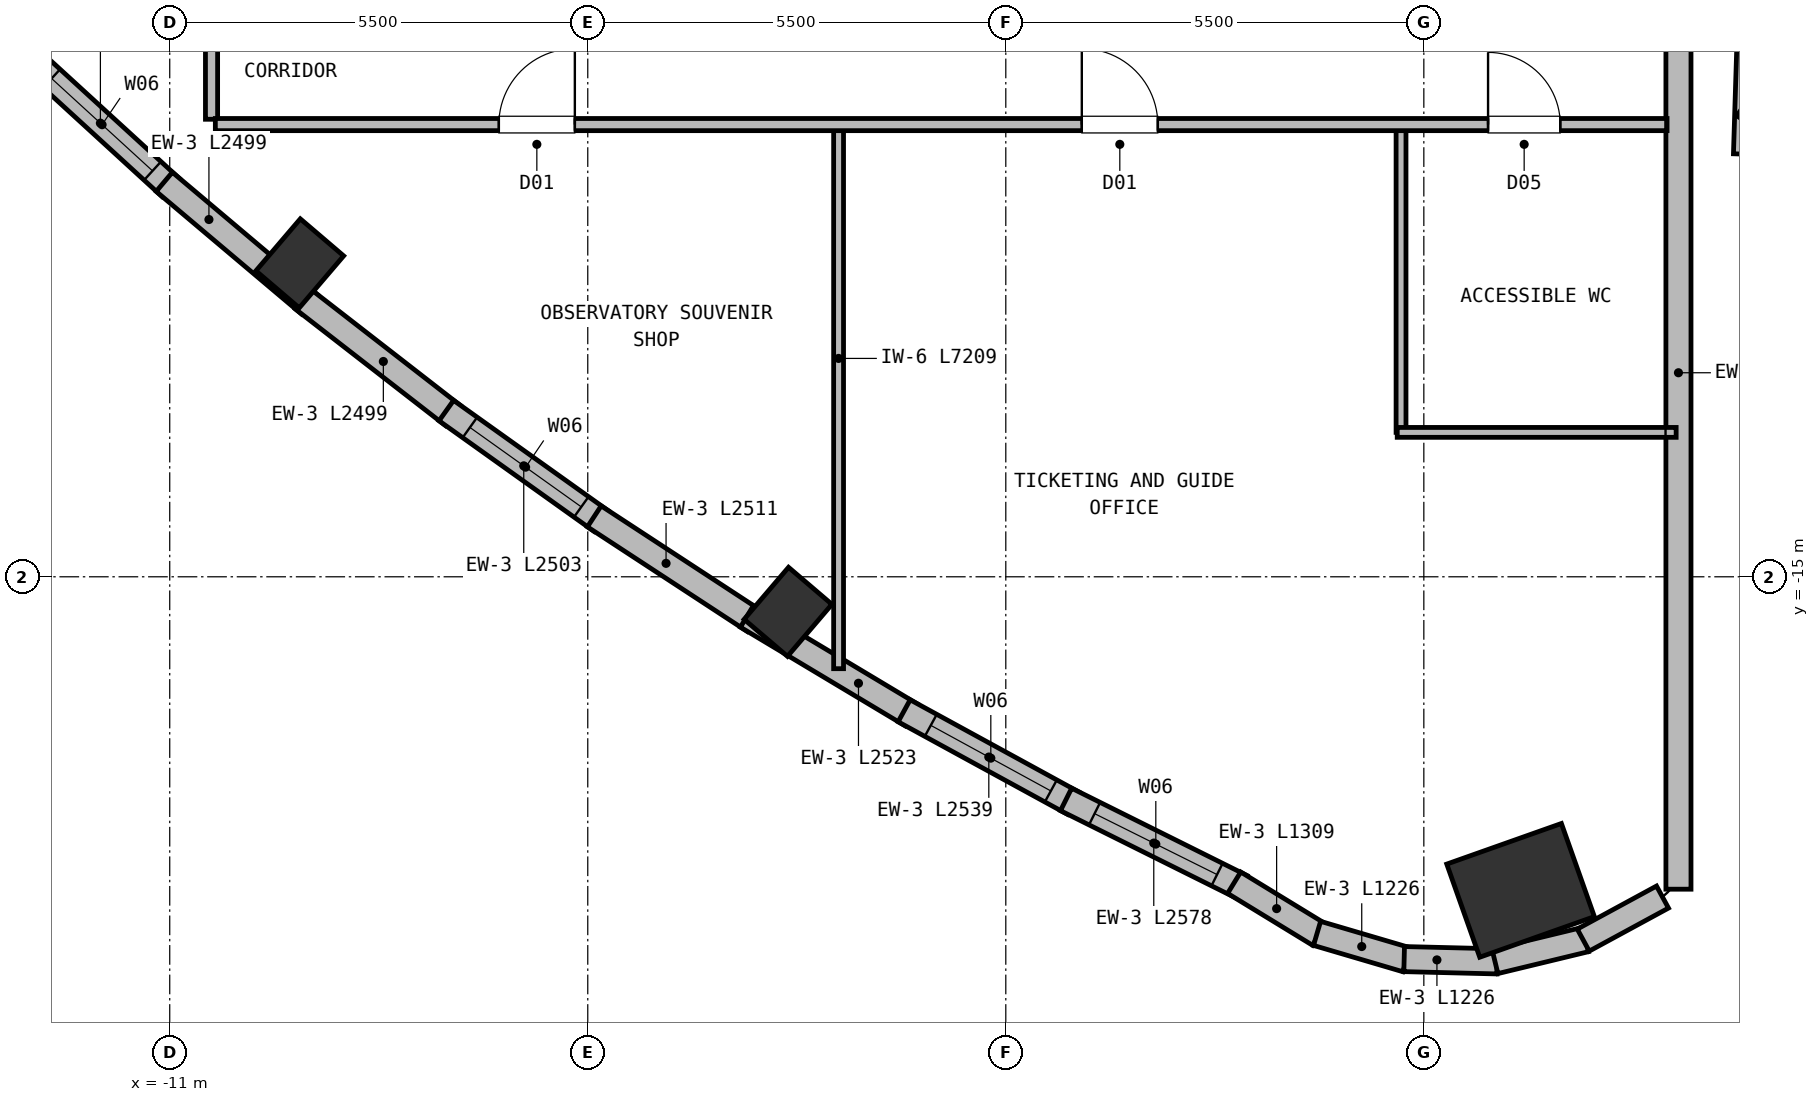
"""IFC4 building model, lengths in metres.
Left out: names, types, materials, properties, quantities, classifications, styles, units other than length and angle.
Written with IfcOpenShell. Run it as: python <this file> out.ifc"""

import sys

from ifc_helpers import new_model, si_unit, direction, frame, frame_2d, origin, origin_2d, place, context, subcontext, project, spatial, rectangle, extrude, element, fill, save


model = new_model("IFC4")
c1 = context("Model", 3, precision=1e-05, world=origin(), true_north=direction((0.0, 1.0)))
c2 = subcontext(c1, "Body", "Model", "MODEL_VIEW")
j1 = project(units=[si_unit("LENGTHUNIT", "METRE"), si_unit("PLANEANGLEUNIT", "RADIAN")], contexts=[c1])
p1 = place(None, origin())
s1 = spatial("IfcSite", under=j1, at=p1, CompositionType="ELEMENT")
p2 = place(p1, origin())
s2 = spatial("IfcBuilding", under=s1, at=p2, CompositionType="ELEMENT")
p3 = place(p2, frame((0.0, 0.0, 286.0)))
s3 = spatial("IfcBuildingStorey", under=s2, at=p3, CompositionType="ELEMENT", Elevation=286.0)
for number, where, z_axis, x_axis in (
    (1, (-9.289, -10.876, 0.0), (0.0, 0.0, 1.0), (-0.76, 0.649, 0.0)),
    (2, (-2.865, -15.461, 0.0), (0.0, 0.0, 1.0), (-0.76, 0.649, 0.0)),
):
    element("IfcColumn", number, at=place(p3, frame(where, z_axis=z_axis, x_axis=x_axis)), inside=s3, PredefinedType="COLUMN", context=c2, shape_type="SweptSolid", body=[
        extrude(rectangle(XDim=0.75, YDim=0.9, at=origin_2d()), origin(), (0.0, 0.0, 1.0), 4.4),
    ])
p4 = place(p3, frame((6.773, -19.126, 0.0), z_axis=(0.0, 0.0, 1.0), x_axis=(-0.333806859234, 0.942641491092, 0.0)))
e3 = element("IfcColumn", 3, at=p4, inside=s3, PredefinedType="COLUMN", context=c2, shape_type="SweptSolid", body=[
    extrude(rectangle(XDim=1.3, YDim=1.6, at=origin_2d()), origin(), (0.0, 0.0, 1.0), 4.4),
])
p5 = place(p3, frame((8.85, -5.52, 0.0), z_axis=(0.0, 0.0, 1.0), x_axis=(0.0, -1.0, 0.0)))
e4 = element("IfcWall", 4, at=p5, inside=s3, PredefinedType="SOLIDWALL", context=c2, shape_type="SweptSolid", body=[
    extrude(rectangle(XDim=13.591, YDim=0.33, at=frame_2d((6.795, 0.0))), origin(), (0.0, 0.0, 1.0), 4.13),
])
p6 = place(p3, frame((9.739, -9.439, 0.0), z_axis=(0.0, 0.0, 1.0), x_axis=(0.031147484759, 0.999514799387, 0.0)))
e5 = element("IfcWall", 5, at=p6, inside=s3, PredefinedType="SOLIDWALL", context=c2, shape_type="SweptSolid", body=[
    extrude(rectangle(XDim=6.114, YDim=0.33, at=frame_2d((3.057, 0.0))), origin(), (0.0, 0.0, 1.0), 3.65),
])
p7 = place(p3, frame((-10.989, -9.876, 0.0), z_axis=(0.0, 0.0, 1.0), x_axis=(-0.737627628948, 0.675207731748, 0.0)))
e6 = element("IfcWall", 6, at=p7, inside=s3, PredefinedType="SOLIDWALL", context=c2, shape_type="SweptSolid", body=[
    extrude(rectangle(XDim=2.503, YDim=0.33, at=frame_2d((1.251, 0.0))), origin(), (0.0, 0.0, 1.0), 4.13),
])
p8 = place(p7, frame((0.322, 0.0, 0.72)))
e7 = element("IfcOpeningElement", 7, at=p8, cuts=e6, PredefinedType="OPENING", context=c2, shape_type="SweptSolid", body=[
    extrude(rectangle(XDim=1.8, YDim=2.25, at=frame_2d((0.9, 1.125))), frame((0.0, 0.175, 0.0), z_axis=(0.0, -1.0, 0.0), x_axis=(1.0, 0.0, 0.0)), (0.0, 0.0, 1.0), 0.35),
])
p9 = place(p3, frame((-9.161, -11.415, 0.0), z_axis=(0.0, 0.0, 1.0), x_axis=(-0.764315556833, 0.644842406781, 0.0)))
e8 = element("IfcWall", 8, at=p9, inside=s3, PredefinedType="SOLIDWALL", context=c2, shape_type="SweptSolid", body=[
    extrude(rectangle(XDim=2.499, YDim=0.33, at=frame_2d((1.25, 0.0))), origin(), (0.0, 0.0, 1.0), 4.13),
])
p10 = place(p3, frame((-7.273, -12.879, 0.0), z_axis=(0.0, 0.0, 1.0), x_axis=(-0.789841179094, 0.613311431336, 0.0)))
e9 = element("IfcWall", 9, at=p10, inside=s3, PredefinedType="SOLIDWALL", context=c2, shape_type="SweptSolid", body=[
    extrude(rectangle(XDim=2.499, YDim=0.33, at=frame_2d((1.25, 0.0))), origin(), (0.0, 0.0, 1.0), 4.13),
])
p11 = place(p3, frame((-5.323, -14.267, 0.0), z_axis=(0.0, 0.0, 1.0), x_axis=(-0.814029925436, 0.580822933857, 0.0)))
e10 = element("IfcWall", 10, at=p11, inside=s3, PredefinedType="SOLIDWALL", context=c2, shape_type="SweptSolid", body=[
    extrude(rectangle(XDim=2.503, YDim=0.33, at=frame_2d((1.251, 0.0))), origin(), (0.0, 0.0, 1.0), 4.13),
])
p12 = place(p11, frame((0.322, 0.0, 0.72)))
e11 = element("IfcOpeningElement", 11, at=p12, cuts=e10, PredefinedType="OPENING", context=c2, shape_type="SweptSolid", body=[
    extrude(rectangle(XDim=1.8, YDim=2.25, at=frame_2d((0.9, 1.125))), frame((0.0, 0.175, 0.0), z_axis=(0.0, -1.0, 0.0), x_axis=(1.0, 0.0, 0.0)), (0.0, 0.0, 1.0), 0.35),
])
p13 = place(p3, frame((-3.313, -15.58, 0.0), z_axis=(0.0, 0.0, 1.0), x_axis=(-0.836746876737, 0.547589868671, 0.0)))
e12 = element("IfcWall", 12, at=p13, inside=s3, PredefinedType="SOLIDWALL", context=c2, shape_type="SweptSolid", body=[
    extrude(rectangle(XDim=2.511, YDim=0.33, at=frame_2d((1.255, 0.0))), origin(), (0.0, 0.0, 1.0), 4.13),
])
p14 = place(p3, frame((-1.242, -16.818, 0.0), z_axis=(0.0, 0.0, 1.0), x_axis=(-0.857902474262, 0.513812557899, 0.0)))
e13 = element("IfcWall", 13, at=p14, inside=s3, PredefinedType="SOLIDWALL", context=c2, shape_type="SweptSolid", body=[
    extrude(rectangle(XDim=2.523, YDim=0.33, at=frame_2d((1.262, 0.0))), origin(), (0.0, 0.0, 1.0), 4.13),
])
p15 = place(p3, frame((0.89, -17.98, 0.0), z_axis=(0.0, 0.0, 1.0), x_axis=(-0.877542510611, 0.479498844702, 0.0)))
e14 = element("IfcWall", 14, at=p15, inside=s3, PredefinedType="SOLIDWALL", context=c2, shape_type="SweptSolid", body=[
    extrude(rectangle(XDim=2.539, YDim=0.33, at=frame_2d((1.269, 0.0))), origin(), (0.0, 0.0, 1.0), 4.13),
])
p16 = place(p15, frame((0.339, 0.0, 0.72)))
e15 = element("IfcOpeningElement", 15, at=p16, cuts=e14, PredefinedType="OPENING", context=c2, shape_type="SweptSolid", body=[
    extrude(rectangle(XDim=1.8, YDim=2.25, at=frame_2d((0.9, 1.125))), frame((0.0, 0.175, 0.0), z_axis=(0.0, -1.0, 0.0), x_axis=(1.0, 0.0, 0.0)), (0.0, 0.0, 1.0), 0.35),
])
p17 = place(p3, frame((3.101, -19.078, 0.0), z_axis=(0.0, 0.0, 1.0), x_axis=(-0.895277941462, 0.445508033073, 0.0)))
e16 = element("IfcWall", 16, at=p17, inside=s3, PredefinedType="SOLIDWALL", context=c2, shape_type="SweptSolid", body=[
    extrude(rectangle(XDim=2.578, YDim=0.33, at=frame_2d((1.289, 0.0))), origin(), (0.0, 0.0, 1.0), 4.13),
])
p18 = place(p17, frame((0.359, 0.0, 0.72)))
e17 = element("IfcOpeningElement", 17, at=p18, cuts=e16, PredefinedType="OPENING", context=c2, shape_type="SweptSolid", body=[
    extrude(rectangle(XDim=1.8, YDim=2.25, at=frame_2d((0.9, 1.125))), frame((0.0, 0.175, 0.0), z_axis=(0.0, -1.0, 0.0), x_axis=(1.0, 0.0, 0.0)), (0.0, 0.0, 1.0), 0.35),
])
p19 = place(p3, frame((4.122, -19.708, 0.0), z_axis=(0.0, 0.0, 1.0), x_axis=(-0.853318707867, 0.521389665034, 0.0)))
e18 = element("IfcWall", 18, at=p19, inside=s3, PredefinedType="SOLIDWALL", context=c2, shape_type="SweptSolid", body=[
    extrude(rectangle(XDim=1.309, YDim=0.33, at=frame_2d((0.655, 0.0))), origin(), (0.0, 0.0, 1.0), 4.13),
])
for number, where, z_axis, x_axis in (
    (19, (5.271, -20.038, 0.0), (0.0, 0.0, 1.0), (-0.959, 0.283, 0.0)),
    (20, (6.467, -20.061, 0.0), (0.0, 0.0, 1.0), (-1.0, 0.025, 0.0)),
):
    element("IfcWall", number, at=place(p3, frame(where, z_axis=z_axis, x_axis=x_axis)), inside=s3, PredefinedType="SOLIDWALL", context=c2, shape_type="SweptSolid", body=[
        extrude(rectangle(XDim=1.226, YDim=0.33, at=frame_2d((0.613, 0.0))), origin(), (0.0, 0.0, 1.0), 4.13),
    ])
p20 = place(p3, frame((7.627, -19.772, 0.0), z_axis=(0.0, 0.0, 1.0), x_axis=(-0.97199913572, -0.234984425353, 0.0)))
e21 = element("IfcWall", 21, at=p20, inside=s3, PredefinedType="SOLIDWALL", context=c2, shape_type="SweptSolid", body=[
    extrude(rectangle(XDim=1.226, YDim=0.33, at=frame_2d((0.613, 0.0))), origin(), (0.0, 0.0, 1.0), 4.13),
])
p21 = place(p3, frame((8.64, -19.214, 0.0), z_axis=(0.0, 0.0, 1.0), x_axis=(-0.878860825238, -0.477078242914, 0.0)))
e22 = element("IfcWall", 22, at=p21, inside=s3, PredefinedType="SOLIDWALL", context=c2, shape_type="SweptSolid", body=[
    extrude(rectangle(XDim=1.187, YDim=0.33, at=frame_2d((0.593, 0.0))), origin(), (0.0, 0.0, 1.0), 4.13),
])
p22 = place(p3, frame((12.352, -10.593, 0.0), z_axis=(0.0, 0.0, 1.0), x_axis=(-0.82687387766, 0.562387402459, 0.0)))
e23 = element("IfcWall", 23, at=p22, inside=s3, PredefinedType="SOLIDWALL", context=c2, shape_type="SweptSolid", body=[
    extrude(rectangle(XDim=3.193, YDim=0.33, at=frame_2d((1.596, 0.0))), origin(), (0.0, 0.0, 1.0), 3.65),
])
p23 = place(p3, frame((-2.2, -9.0, 0.0), z_axis=(0.0, 0.0, 1.0), x_axis=(0.0, -1.0, 0.0)))
e24 = element("IfcWall", 24, at=p23, inside=s3, PredefinedType="PARTITIONING", context=c2, shape_type="SweptSolid", body=[
    extrude(rectangle(XDim=7.209, YDim=0.13, at=frame_2d((3.604, 0.0))), origin(), (0.0, 0.0, 1.0), 3.71),
])
p24 = place(p3, frame((5.2, -9.0, 0.0), z_axis=(0.0, 0.0, 1.0), x_axis=(0.0, -1.0, 0.0)))
e25 = element("IfcWall", 25, at=p24, inside=s3, PredefinedType="PARTITIONING", context=c2, shape_type="SweptSolid", body=[
    extrude(rectangle(XDim=4.1, YDim=0.13, at=frame_2d((2.05, 0.0))), origin(), (0.0, 0.0, 1.0), 4.13),
])
p25 = place(p3, frame((5.15, -13.1, 0.0), z_axis=(0.0, 0.0, 1.0), x_axis=(1.0, 0.0, 0.0)))
e26 = element("IfcWall", 26, at=p25, inside=s3, PredefinedType="PARTITIONING", context=c2, shape_type="SweptSolid", body=[
    extrude(rectangle(XDim=3.67, YDim=0.13, at=frame_2d((1.835, 0.0))), origin(), (0.0, 0.0, 1.0), 4.13),
])
p26 = place(p3, frame((-10.45, 1.1, 0.0), z_axis=(0.0, 0.0, 1.0), x_axis=(0.0, -1.0, 0.0)))
e27 = element("IfcWall", 27, at=p26, inside=s3, PredefinedType="PARTITIONING", context=c2, shape_type="SweptSolid", body=[
    extrude(rectangle(XDim=10.08, YDim=0.16, at=frame_2d((5.04, 0.0))), origin(), (0.0, 0.0, 1.0), 4.13),
])
p27 = place(p3, frame((-10.4, -9.05, 0.0), z_axis=(0.0, 0.0, 1.0), x_axis=(1.0, 0.0, 0.0)))
e28 = element("IfcWall", 28, at=p27, inside=s3, PredefinedType="PARTITIONING", context=c2, shape_type="SweptSolid", body=[
    extrude(rectangle(XDim=19.1, YDim=0.16, at=frame_2d((9.55, 0.0))), origin(), (0.0, 0.0, 1.0), 4.13),
])
p28 = place(p27, frame((3.73, 0.0, 0.0)))
e29 = element("IfcOpeningElement", 29, at=p28, cuts=e28, PredefinedType="OPENING", context=c2, shape_type="SweptSolid", body=[
    extrude(rectangle(XDim=1.0, YDim=2.15, at=frame_2d((0.5, 1.075))), frame((0.0, 0.09, 0.0), z_axis=(0.0, -1.0, 0.0), x_axis=(1.0, 0.0, 0.0)), (0.0, 0.0, 1.0), 0.18),
])
p29 = place(p27, frame((11.4, 0.0, 0.0)))
e30 = element("IfcOpeningElement", 30, at=p29, cuts=e28, PredefinedType="OPENING", context=c2, shape_type="SweptSolid", body=[
    extrude(rectangle(XDim=1.0, YDim=2.15, at=frame_2d((0.5, 1.075))), frame((0.0, 0.09, 0.0), z_axis=(0.0, -1.0, 0.0), x_axis=(1.0, 0.0, 0.0)), (0.0, 0.0, 1.0), 0.18),
])
p30 = place(p27, frame((16.745, 0.0, 0.0)))
e31 = element("IfcOpeningElement", 31, at=p30, cuts=e28, PredefinedType="OPENING", context=c2, shape_type="SweptSolid", body=[
    extrude(rectangle(XDim=0.95, YDim=2.1, at=frame_2d((0.475, 1.05))), frame((0.0, 0.09, 0.0), z_axis=(0.0, -1.0, 0.0), x_axis=(1.0, 0.0, 0.0)), (0.0, 0.0, 1.0), 0.18),
])
p31 = place(p8, origin())
e32 = element("IfcWindow", 32, at=p31, inside=s3, PartitioningType="SINGLE_PANEL", PredefinedType="WINDOW", context=c2, shape_type="SweptSolid", body=[
    extrude(rectangle(XDim=1.8, YDim=2.25, at=frame_2d((0.9, 1.125))), frame((0.0, 0.03, 0.0), z_axis=(0.0, -1.0, 0.0), x_axis=(1.0, 0.0, 0.0)), (0.0, 0.0, 1.0), 0.06),
])
fill(e7, e32)
p32 = place(p12, origin())
e33 = element("IfcWindow", 33, at=p32, inside=s3, PartitioningType="SINGLE_PANEL", PredefinedType="WINDOW", context=c2, shape_type="SweptSolid", body=[
    extrude(rectangle(XDim=1.8, YDim=2.25, at=frame_2d((0.9, 1.125))), frame((0.0, 0.03, 0.0), z_axis=(0.0, -1.0, 0.0), x_axis=(1.0, 0.0, 0.0)), (0.0, 0.0, 1.0), 0.06),
])
fill(e11, e33)
p33 = place(p16, origin())
e34 = element("IfcWindow", 34, at=p33, inside=s3, PartitioningType="SINGLE_PANEL", PredefinedType="WINDOW", context=c2, shape_type="SweptSolid", body=[
    extrude(rectangle(XDim=1.8, YDim=2.25, at=frame_2d((0.9, 1.125))), frame((0.0, 0.03, 0.0), z_axis=(0.0, -1.0, 0.0), x_axis=(1.0, 0.0, 0.0)), (0.0, 0.0, 1.0), 0.06),
])
fill(e15, e34)
p34 = place(p18, origin())
e35 = element("IfcWindow", 35, at=p34, inside=s3, PartitioningType="SINGLE_PANEL", PredefinedType="WINDOW", context=c2, shape_type="SweptSolid", body=[
    extrude(rectangle(XDim=1.8, YDim=2.25, at=frame_2d((0.9, 1.125))), frame((0.0, 0.03, 0.0), z_axis=(0.0, -1.0, 0.0), x_axis=(1.0, 0.0, 0.0)), (0.0, 0.0, 1.0), 0.06),
])
fill(e17, e35)
p35 = place(p28, origin())
e36 = element("IfcDoor", 36, at=p35, inside=s3, OperationType="SINGLE_SWING_RIGHT", PredefinedType="DOOR", context=c2, shape_type="SweptSolid", body=[
    extrude(rectangle(XDim=1.0, YDim=2.15, at=frame_2d((0.5, 1.075))), frame((0.0, 0.025, 0.0), z_axis=(0.0, -1.0, 0.0), x_axis=(1.0, 0.0, 0.0)), (0.0, 0.0, 1.0), 0.05),
])
fill(e29, e36)
p36 = place(p29, origin())
e37 = element("IfcDoor", 37, at=p36, inside=s3, OperationType="SINGLE_SWING_LEFT", PredefinedType="DOOR", context=c2, shape_type="SweptSolid", body=[
    extrude(rectangle(XDim=1.0, YDim=2.15, at=frame_2d((0.5, 1.075))), frame((0.0, 0.025, 0.0), z_axis=(0.0, -1.0, 0.0), x_axis=(1.0, 0.0, 0.0)), (0.0, 0.0, 1.0), 0.05),
])
fill(e30, e37)
p37 = place(p30, origin())
e38 = element("IfcDoor", 38, at=p37, inside=s3, OperationType="SINGLE_SWING_LEFT", PredefinedType="DOOR", context=c2, shape_type="SweptSolid", body=[
    extrude(rectangle(XDim=0.95, YDim=2.1, at=frame_2d((0.475, 1.05))), frame((0.0, 0.025, 0.0), z_axis=(0.0, -1.0, 0.0), x_axis=(1.0, 0.0, 0.0)), (0.0, 0.0, 1.0), 0.05),
])
fill(e31, e38)
save(model, sys.argv[1])
